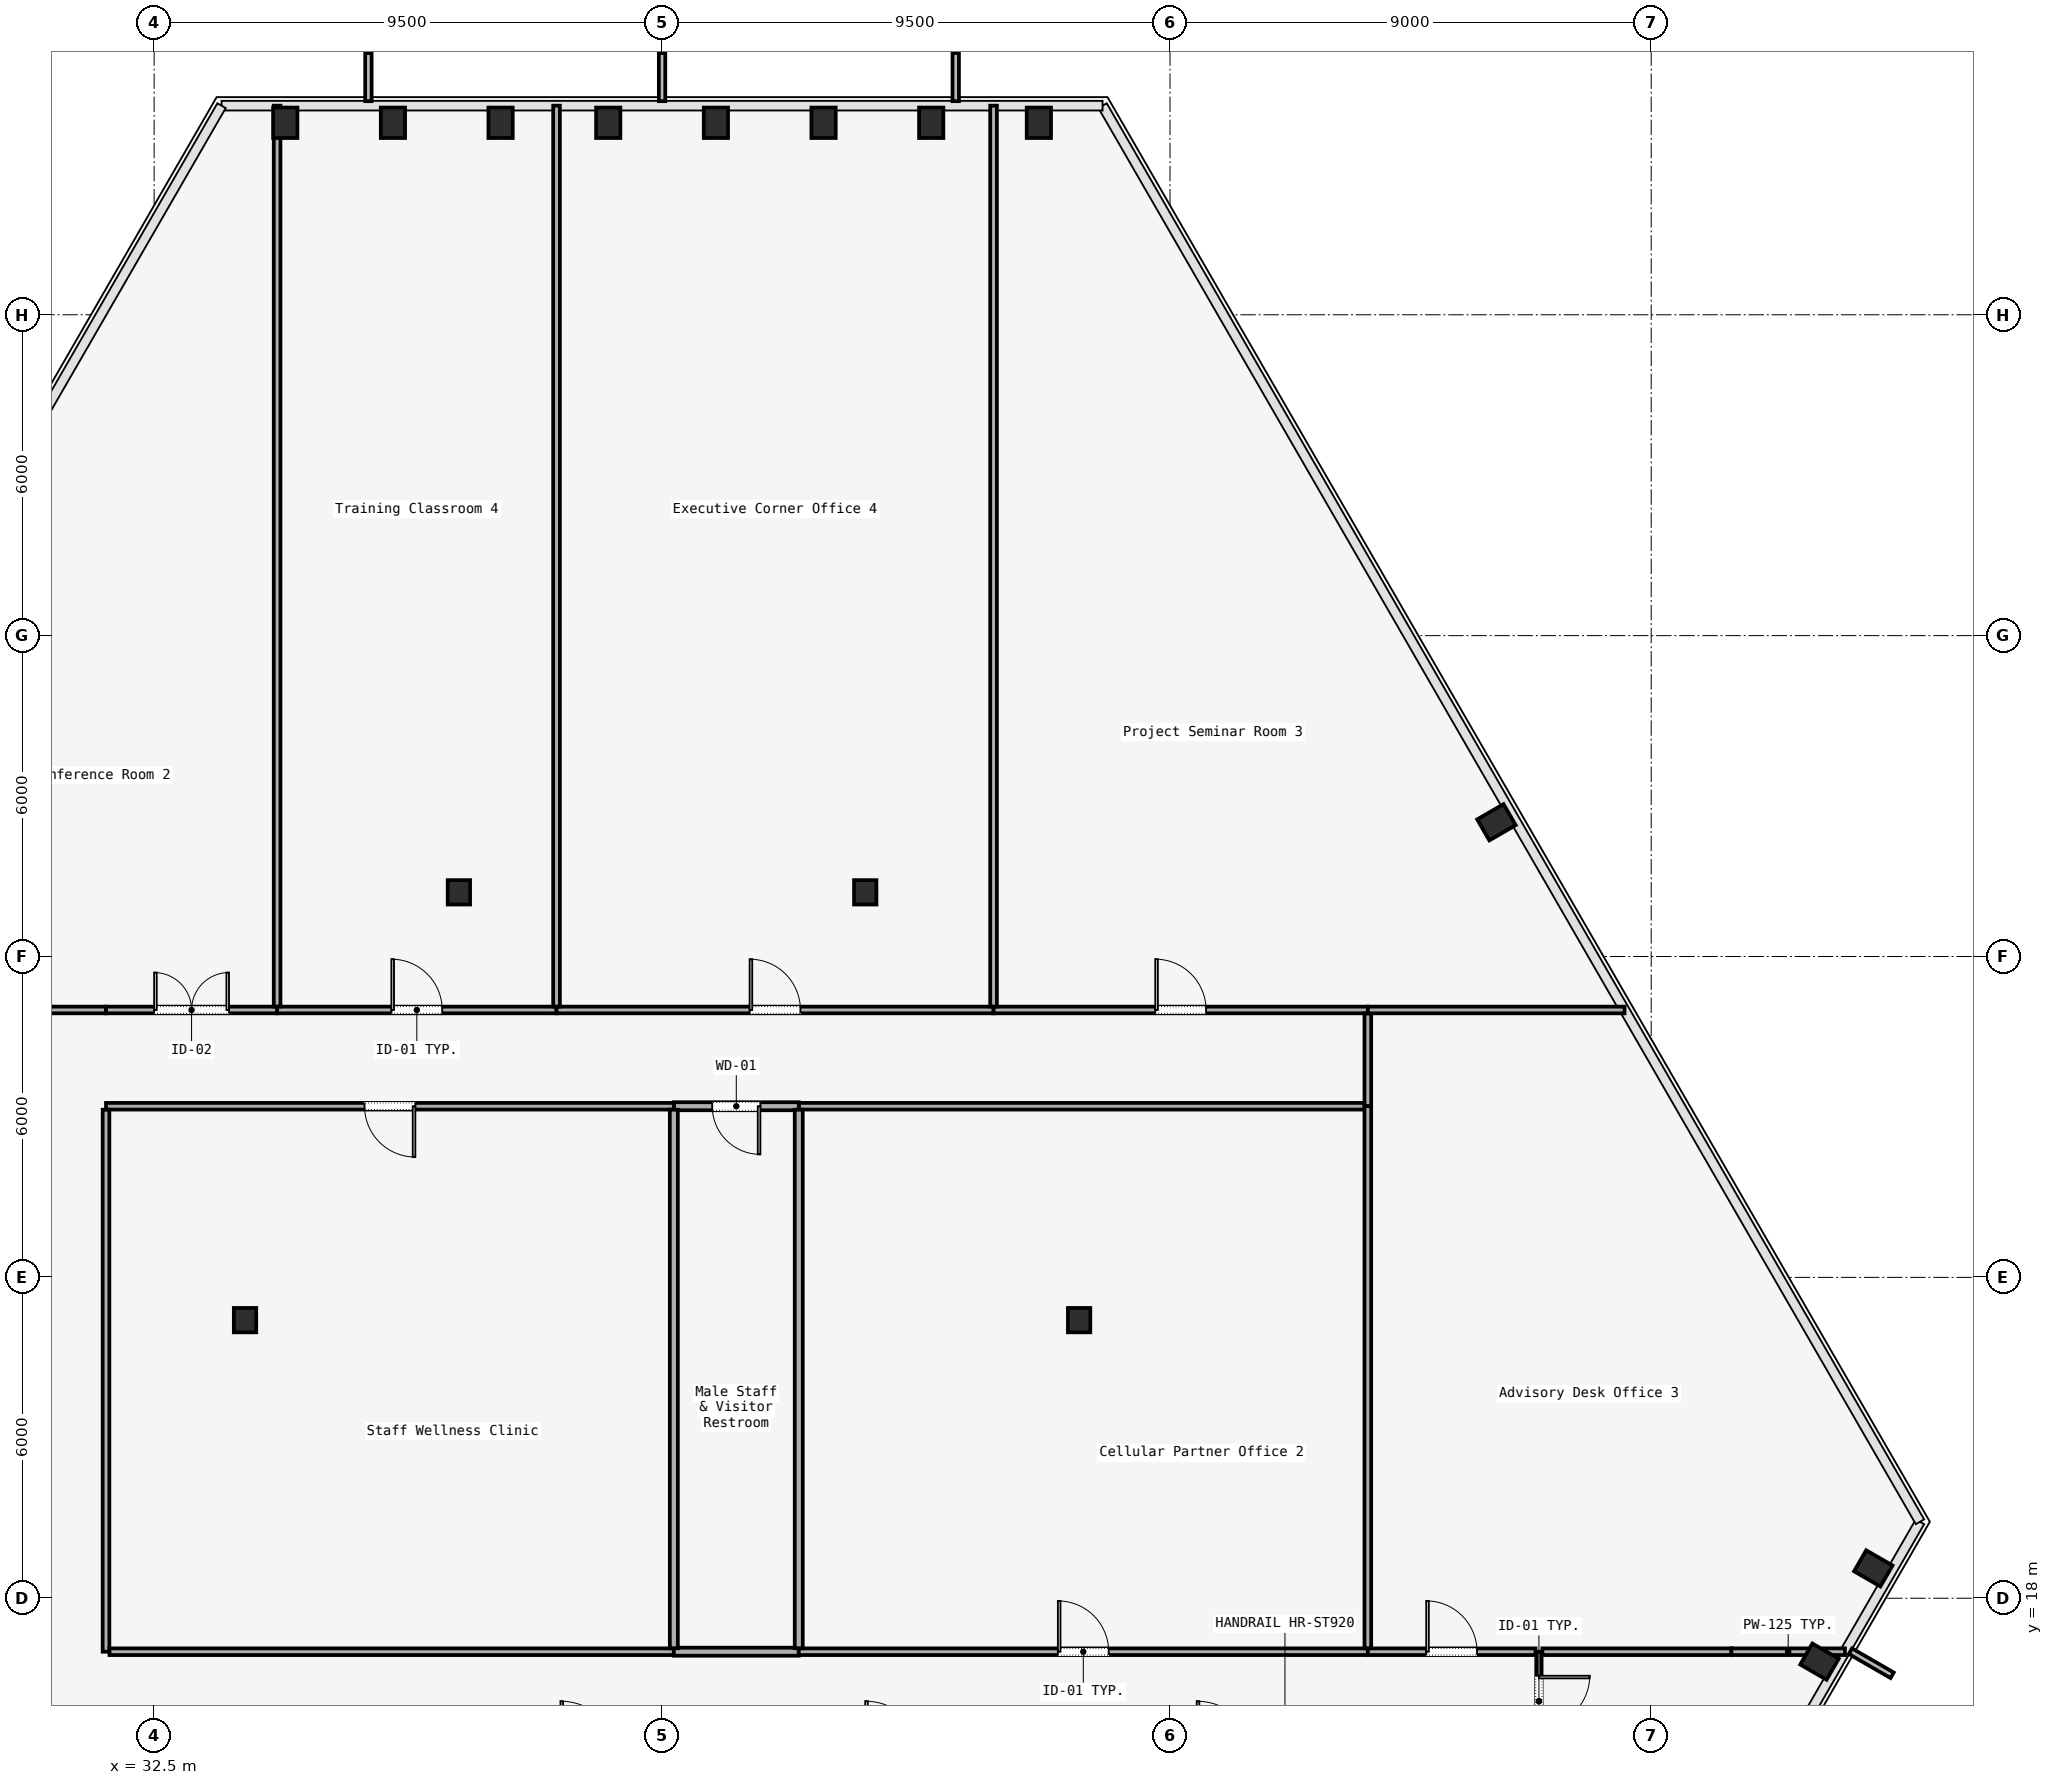
"""IFC4 building model, lengths in metres.
Left out: names, types, materials, properties, quantities, classifications, styles, units other than length and angle.
Written with IfcOpenShell. Run it as: python <this file> out.ifc"""

import sys

from ifc_helpers import new_model, si_unit, direction, frame, frame_2d, origin, origin_2d, place, context, subcontext, project, spatial, rectangle, i_section, extrude, element, fill, save


model = new_model("IFC4")
c1 = context("Model", 3, precision=1e-05, world=origin(), true_north=direction((0.0, 1.0)))
c2 = subcontext(c1, "Body", "Model", "MODEL_VIEW")
j1 = project(units=[si_unit("LENGTHUNIT", "METRE"), si_unit("PLANEANGLEUNIT", "RADIAN")], contexts=[c1])
p1 = place(None, origin())
s1 = spatial("IfcSite", under=j1, at=p1, CompositionType="ELEMENT")
p2 = place(p1, origin())
s2 = spatial("IfcBuilding", under=s1, at=p2, CompositionType="ELEMENT")
p3 = place(p2, frame((0.0, 0.0, 39.8)))
s3 = spatial("IfcBuildingStorey", under=s2, at=p3, CompositionType="ELEMENT", Elevation=39.8)
for number, where, z_axis, x_axis in (
    (1, (34.2, 23.2, 0.0), (0.0, 0.0, 1.0), (1.0, 0.0, 0.0)),
    (2, (49.8, 23.2, 0.0), (0.0, 0.0, 1.0), (1.0, 0.0, 0.0)),
    (3, (38.2, 31.2, 0.0), (0.0, 0.0, 1.0), (1.0, 0.0, 0.0)),
    (4, (45.8, 31.2, 0.0), (0.0, 0.0, 1.0), (1.0, 0.0, 0.0)),
):
    element("IfcColumn", number, at=place(p3, frame(where, z_axis=z_axis, x_axis=x_axis)), inside=s3, PredefinedType="COLUMN", context=c2, shape_type="SweptSolid", body=[
        extrude(i_section(OverallWidth=0.418, OverallDepth=0.456, WebThickness=0.042, FlangeThickness=0.067, FilletRadius=0.015, at=origin_2d()), origin(), (0.0, 0.0, 1.0), 3.58),
    ])
for number, where, z_axis, x_axis in (
    (5, (63.647, 16.814, 0.0), (0.0, 0.0, 1.0), (0.5, 0.866, 0.0)),
    (6, (64.654, 18.558, 0.0), (0.0, 0.0, 1.0), (0.5, 0.866, 0.0)),
    (7, (57.606, 32.51, 0.0), (0.0, 0.0, 1.0), (-0.5, 0.866, 0.0)),
    (8, (49.047, 45.59, 0.0), (0.0, 0.0, 1.0), (1.0, 0.0, 0.0)),
    (9, (47.034, 45.59, 0.0), (0.0, 0.0, 1.0), (1.0, 0.0, 0.0)),
    (10, (45.02, 45.59, 0.0), (0.0, 0.0, 1.0), (1.0, 0.0, 0.0)),
    (11, (43.007, 45.59, 0.0), (0.0, 0.0, 1.0), (1.0, 0.0, 0.0)),
    (12, (40.993, 45.59, 0.0), (0.0, 0.0, 1.0), (1.0, 0.0, 0.0)),
    (13, (38.98, 45.59, 0.0), (0.0, 0.0, 1.0), (1.0, 0.0, 0.0)),
    (14, (36.966, 45.59, 0.0), (0.0, 0.0, 1.0), (1.0, 0.0, 0.0)),
    (15, (34.953, 45.59, 0.0), (0.0, 0.0, 1.0), (1.0, 0.0, 0.0)),
):
    element("IfcColumn", number, at=place(p3, frame(where, z_axis=z_axis, x_axis=x_axis)), inside=s3, PredefinedType="COLUMN", context=c2, shape_type="SweptSolid", body=[
        extrude(i_section(OverallWidth=0.454, OverallDepth=0.569, WebThickness=0.078, FlangeThickness=0.08, FilletRadius=0.015, at=origin_2d()), origin(), (0.0, 0.0, 1.0), 3.58),
    ])
p4 = place(p3, frame((58.4, 17.0, 0.0), z_axis=(0.0, 0.0, 1.0), x_axis=(0.0, -1.0, 0.0)))
e16 = element("IfcWall", 16, at=p4, inside=s3, PredefinedType="MOVABLE", context=c2, shape_type="SweptSolid", body=[
    extrude(rectangle(XDim=1.85, YDim=0.1, at=frame_2d((0.925, 0.0))), origin(), (0.0, 0.0, 1.0), 2.933),
])
p5 = place(p4, frame((0.45, 0.0, 0.0)))
e17 = element("IfcOpeningElement", 17, at=p5, cuts=e16, PredefinedType="OPENING", context=c2, shape_type="SweptSolid", body=[
    extrude(rectangle(XDim=0.95, YDim=2.2, at=frame_2d((0.475, 1.1))), frame((0.0, 0.05, 0.0), z_axis=(0.0, -1.0, 0.0), x_axis=(1.0, 0.0, 0.0)), (0.0, 0.0, 1.0), 0.1),
])
p6 = place(p3, frame((29.865, 29.0, 0.0), z_axis=(0.0, 0.0, 1.0), x_axis=(1.0, 0.0, 0.0)))
e18 = element("IfcWall", 18, at=p6, inside=s3, PredefinedType="PARTITIONING", context=c2, shape_type="SweptSolid", body=[
    extrude(rectangle(XDim=1.735, YDim=0.125, at=frame_2d((0.868, 0.0))), origin(), (0.0, 0.0, 1.0), 2.933),
])
p7 = place(p3, frame((31.6, 29.0, 0.0), z_axis=(0.0, 0.0, 1.0), x_axis=(1.0, 0.0, 0.0)))
e19 = element("IfcWall", 19, at=p7, inside=s3, PredefinedType="PARTITIONING", context=c2, shape_type="SweptSolid", body=[
    extrude(rectangle(XDim=3.2, YDim=0.125, at=frame_2d((1.6, 0.0))), origin(), (0.0, 0.0, 1.0), 2.933),
])
p8 = place(p7, frame((0.9, 0.0, 0.0)))
e20 = element("IfcOpeningElement", 20, at=p8, cuts=e19, PredefinedType="OPENING", context=c2, shape_type="SweptSolid", body=[
    extrude(rectangle(XDim=1.4, YDim=2.2, at=frame_2d((0.7, 1.1))), frame((0.0, 0.062, 0.0), z_axis=(0.0, -1.0, 0.0), x_axis=(1.0, 0.0, 0.0)), (0.0, 0.0, 1.0), 0.125),
])
p9 = place(p3, frame((34.8, 29.0, 0.0), z_axis=(0.0, 0.0, 1.0), x_axis=(1.0, 0.0, 0.0)))
e21 = element("IfcWall", 21, at=p9, inside=s3, PredefinedType="PARTITIONING", context=c2, shape_type="SweptSolid", body=[
    extrude(rectangle(XDim=5.226, YDim=0.125, at=frame_2d((2.613, 0.0))), origin(), (0.0, 0.0, 1.0), 2.933),
])
p10 = place(p9, frame((2.138, 0.0, 0.0)))
e22 = element("IfcOpeningElement", 22, at=p10, cuts=e21, PredefinedType="OPENING", context=c2, shape_type="SweptSolid", body=[
    extrude(rectangle(XDim=0.95, YDim=2.2, at=frame_2d((0.475, 1.1))), frame((0.0, 0.062, 0.0), z_axis=(0.0, -1.0, 0.0), x_axis=(1.0, 0.0, 0.0)), (0.0, 0.0, 1.0), 0.125),
])
p11 = place(p3, frame((40.026, 29.0, 0.0), z_axis=(0.0, 0.0, 1.0), x_axis=(1.0, 0.0, 0.0)))
e23 = element("IfcWall", 23, at=p11, inside=s3, PredefinedType="PARTITIONING", context=c2, shape_type="SweptSolid", body=[
    extrude(rectangle(XDim=8.174, YDim=0.125, at=frame_2d((4.087, 0.0))), origin(), (0.0, 0.0, 1.0), 2.933),
])
p12 = place(p11, frame((3.612, 0.0, 0.0)))
e24 = element("IfcOpeningElement", 24, at=p12, cuts=e23, PredefinedType="OPENING", context=c2, shape_type="SweptSolid", body=[
    extrude(rectangle(XDim=0.95, YDim=2.2, at=frame_2d((0.475, 1.1))), frame((0.0, 0.062, 0.0), z_axis=(0.0, -1.0, 0.0), x_axis=(1.0, 0.0, 0.0)), (0.0, 0.0, 1.0), 0.125),
])
p13 = place(p3, frame((48.2, 29.0, 0.0), z_axis=(0.0, 0.0, 1.0), x_axis=(1.0, 0.0, 0.0)))
e25 = element("IfcWall", 25, at=p13, inside=s3, PredefinedType="PARTITIONING", context=c2, shape_type="SweptSolid", body=[
    extrude(rectangle(XDim=7.0, YDim=0.125, at=frame_2d((3.5, 0.0))), origin(), (0.0, 0.0, 1.0), 2.933),
])
p14 = place(p13, frame((3.025, 0.0, 0.0)))
e26 = element("IfcOpeningElement", 26, at=p14, cuts=e25, PredefinedType="OPENING", context=c2, shape_type="SweptSolid", body=[
    extrude(rectangle(XDim=0.95, YDim=2.2, at=frame_2d((0.475, 1.1))), frame((0.0, 0.062, 0.0), z_axis=(0.0, -1.0, 0.0), x_axis=(1.0, 0.0, 0.0)), (0.0, 0.0, 1.0), 0.125),
])
p15 = place(p3, frame((55.2, 28.935, 0.0), z_axis=(0.0, 0.0, 1.0), x_axis=(0.0, -1.0, 0.0)))
e27 = element("IfcWall", 27, at=p15, inside=s3, PredefinedType="PARTITIONING", context=c2, shape_type="SweptSolid", body=[
    extrude(rectangle(XDim=1.735, YDim=0.125, at=frame_2d((0.868, 0.0))), origin(), (0.0, 0.0, 1.0), 2.933),
])
p16 = place(p3, frame((55.135, 27.2, 0.0), z_axis=(0.0, 0.0, 1.0), x_axis=(-1.0, 0.0, 0.0)))
e28 = element("IfcWall", 28, at=p16, inside=s3, PredefinedType="PARTITIONING", context=c2, shape_type="SweptSolid", body=[
    extrude(rectangle(XDim=10.579, YDim=0.125, at=frame_2d((5.289, 0.0))), origin(), (0.0, 0.0, 1.0), 2.933),
])
p17 = place(p3, frame((44.556, 27.2, 0.0), z_axis=(0.0, 0.0, 1.0), x_axis=(-1.0, 0.0, 0.0)))
e29 = element("IfcWall", 29, at=p17, inside=s3, PredefinedType="PARTITIONING", context=c2, shape_type="SweptSolid", body=[
    extrude(rectangle(XDim=2.336, YDim=0.15, at=frame_2d((1.168, 0.0))), origin(), (0.0, 0.0, 1.0), 2.933),
])
p18 = place(p17, frame((0.718, 0.0, 0.0)))
e30 = element("IfcOpeningElement", 30, at=p18, cuts=e29, PredefinedType="OPENING", context=c2, shape_type="SweptSolid", body=[
    extrude(rectangle(XDim=0.9, YDim=2.15, at=frame_2d((0.45, 1.075))), frame((0.0, 0.075, 0.0), z_axis=(0.0, -1.0, 0.0), x_axis=(1.0, 0.0, 0.0)), (0.0, 0.0, 1.0), 0.15),
])
p19 = place(p3, frame((42.22, 27.2, 0.0), z_axis=(0.0, 0.0, 1.0), x_axis=(-1.0, 0.0, 0.0)))
e31 = element("IfcWall", 31, at=p19, inside=s3, PredefinedType="PARTITIONING", context=c2, shape_type="SweptSolid", body=[
    extrude(rectangle(XDim=10.62, YDim=0.125, at=frame_2d((5.31, 0.0))), origin(), (0.0, 0.0, 1.0), 2.933),
])
p20 = place(p19, frame((4.835, 0.0, 0.0)))
e32 = element("IfcOpeningElement", 32, at=p20, cuts=e31, PredefinedType="OPENING", context=c2, shape_type="SweptSolid", body=[
    extrude(rectangle(XDim=0.95, YDim=2.2, at=frame_2d((0.475, 1.1))), frame((0.0, 0.062, 0.0), z_axis=(0.0, -1.0, 0.0), x_axis=(1.0, 0.0, 0.0)), (0.0, 0.0, 1.0), 0.125),
])
p21 = place(p3, frame((31.6, 27.135, 0.0), z_axis=(0.0, 0.0, 1.0), x_axis=(0.0, -1.0, 0.0)))
e33 = element("IfcWall", 33, at=p21, inside=s3, PredefinedType="PARTITIONING", context=c2, shape_type="SweptSolid", body=[
    extrude(rectangle(XDim=10.135, YDim=0.125, at=frame_2d((5.067, 0.0))), origin(), (0.0, 0.0, 1.0), 2.933),
])
p22 = place(p3, frame((31.665, 17.0, 0.0), z_axis=(0.0, 0.0, 1.0), x_axis=(1.0, 0.0, 0.0)))
e34 = element("IfcWall", 34, at=p22, inside=s3, PredefinedType="PARTITIONING", context=c2, shape_type="SweptSolid", body=[
    extrude(rectangle(XDim=10.555, YDim=0.125, at=frame_2d((5.277, 0.0))), origin(), (0.0, 0.0, 1.0), 2.933),
])
p23 = place(p3, frame((42.22, 17.0, 0.0), z_axis=(0.0, 0.0, 1.0), x_axis=(1.0, 0.0, 0.0)))
e35 = element("IfcWall", 35, at=p23, inside=s3, PredefinedType="PARTITIONING", context=c2, shape_type="SweptSolid", body=[
    extrude(rectangle(XDim=2.336, YDim=0.15, at=frame_2d((1.168, 0.0))), origin(), (0.0, 0.0, 1.0), 2.933),
])
p24 = place(p3, frame((44.556, 17.0, 0.0), z_axis=(0.0, 0.0, 1.0), x_axis=(1.0, 0.0, 0.0)))
e36 = element("IfcWall", 36, at=p24, inside=s3, PredefinedType="PARTITIONING", context=c2, shape_type="SweptSolid", body=[
    extrude(rectangle(XDim=10.644, YDim=0.125, at=frame_2d((5.322, 0.0))), origin(), (0.0, 0.0, 1.0), 2.933),
])
p25 = place(p24, frame((4.847, 0.0, 0.0)))
e37 = element("IfcOpeningElement", 37, at=p25, cuts=e36, PredefinedType="OPENING", context=c2, shape_type="SweptSolid", body=[
    extrude(rectangle(XDim=0.95, YDim=2.2, at=frame_2d((0.475, 1.1))), frame((0.0, 0.062, 0.0), z_axis=(0.0, -1.0, 0.0), x_axis=(1.0, 0.0, 0.0)), (0.0, 0.0, 1.0), 0.125),
])
p26 = place(p3, frame((55.2, 17.0, 0.0), z_axis=(0.0, 0.0, 1.0), x_axis=(1.0, 0.0, 0.0)))
e38 = element("IfcWall", 38, at=p26, inside=s3, PredefinedType="PARTITIONING", context=c2, shape_type="SweptSolid", body=[
    extrude(rectangle(XDim=3.135, YDim=0.125, at=frame_2d((1.567, 0.0))), origin(), (0.0, 0.0, 1.0), 2.933),
])
p27 = place(p26, frame((1.093, 0.0, 0.0)))
e39 = element("IfcOpeningElement", 39, at=p27, cuts=e38, PredefinedType="OPENING", context=c2, shape_type="SweptSolid", body=[
    extrude(rectangle(XDim=0.95, YDim=2.2, at=frame_2d((0.475, 1.1))), frame((0.0, 0.062, 0.0), z_axis=(0.0, -1.0, 0.0), x_axis=(1.0, 0.0, 0.0)), (0.0, 0.0, 1.0), 0.125),
])
p28 = place(p3, frame((58.465, 17.0, 0.0), z_axis=(0.0, 0.0, 1.0), x_axis=(1.0, 0.0, 0.0)))
e40 = element("IfcWall", 40, at=p28, inside=s3, PredefinedType="PARTITIONING", context=c2, shape_type="SweptSolid", body=[
    extrude(rectangle(XDim=3.535, YDim=0.125, at=frame_2d((1.768, 0.0))), origin(), (0.0, 0.0, 1.0), 2.933),
])
p29 = place(p3, frame((62.0, 17.0, 0.0), z_axis=(0.0, 0.0, 1.0), x_axis=(1.0, 0.0, 0.0)))
e41 = element("IfcWall", 41, at=p29, inside=s3, PredefinedType="PARTITIONING", context=c2, shape_type="SweptSolid", body=[
    extrude(rectangle(XDim=2.124, YDim=0.125, at=frame_2d((1.062, 0.0))), origin(), (0.0, 0.0, 1.0), 2.933),
])
for number, where, z_axis, x_axis in (
    (42, (42.22, 27.135, 0.0), (0.0, 0.0, 1.0), (0.0, -1.0, 0.0)),
    (43, (44.556, 27.135, 0.0), (0.0, 0.0, 1.0), (0.0, -1.0, 0.0)),
):
    element("IfcWall", number, at=place(p3, frame(where, z_axis=z_axis, x_axis=x_axis)), inside=s3, PredefinedType="PARTITIONING", context=c2, shape_type="SweptSolid", body=[
        extrude(rectangle(XDim=10.07, YDim=0.15, at=frame_2d((5.035, 0.0))), origin(), (0.0, 0.0, 1.0), 2.933),
    ])
p30 = place(p3, frame((55.2, 27.2, 0.0), z_axis=(0.0, 0.0, 1.0), x_axis=(0.0, -1.0, 0.0)))
e44 = element("IfcWall", 44, at=p30, inside=s3, PredefinedType="PARTITIONING", context=c2, shape_type="SweptSolid", body=[
    extrude(rectangle(XDim=10.135, YDim=0.125, at=frame_2d((5.067, 0.0))), origin(), (0.0, 0.0, 1.0), 2.933),
])
p31 = place(p3, frame((55.2, 29.0, 0.0), z_axis=(0.0, 0.0, 1.0), x_axis=(1.0, 0.0, 0.0)))
e45 = element("IfcWall", 45, at=p31, inside=s3, PredefinedType="PARTITIONING", context=c2, shape_type="SweptSolid", body=[
    extrude(rectangle(XDim=4.802, YDim=0.125, at=frame_2d((2.401, 0.0))), origin(), (0.0, 0.0, 1.0), 2.933),
])
for number, where, z_axis, x_axis in (
    (46, (34.8, 45.91, 0.0), (0.0, 0.0, 1.0), (0.0, -1.0, 0.0)),
    (47, (48.2, 29.065, 0.0), (0.0, 0.0, 1.0), (0.0, 1.0, 0.0)),
    (48, (40.026, 29.065, 0.0), (0.0, 0.0, 1.0), (0.0, 1.0, 0.0)),
):
    element("IfcWall", number, at=place(p3, frame(where, z_axis=z_axis, x_axis=x_axis)), inside=s3, PredefinedType="PARTITIONING", context=c2, shape_type="SweptSolid", body=[
        extrude(rectangle(XDim=16.845, YDim=0.125, at=frame_2d((8.422, 0.0))), origin(), (0.0, 0.0, 1.0), 2.933),
    ])
p32 = place(p5, origin())
e49 = element("IfcDoor", 49, at=p32, inside=s3, OperationType="SINGLE_SWING_LEFT", PredefinedType="DOOR", context=c2, shape_type="SweptSolid", body=[
    extrude(rectangle(XDim=0.95, YDim=2.2, at=frame_2d((0.475, 1.1))), frame((0.0, 0.025, 0.0), z_axis=(0.0, -1.0, 0.0), x_axis=(1.0, 0.0, 0.0)), (0.0, 0.0, 1.0), 0.05),
])
fill(e17, e49)
p33 = place(p20, origin())
e50 = element("IfcDoor", 50, at=p33, inside=s3, OperationType="SINGLE_SWING_LEFT", PredefinedType="DOOR", context=c2, shape_type="SweptSolid", body=[
    extrude(rectangle(XDim=0.95, YDim=2.2, at=frame_2d((0.475, 1.1))), frame((0.0, 0.025, 0.0), z_axis=(0.0, -1.0, 0.0), x_axis=(1.0, 0.0, 0.0)), (0.0, 0.0, 1.0), 0.05),
])
fill(e32, e50)
p34 = place(p18, origin())
e51 = element("IfcDoor", 51, at=p34, inside=s3, OperationType="SINGLE_SWING_RIGHT", PredefinedType="DOOR", context=c2, shape_type="SweptSolid", body=[
    extrude(rectangle(XDim=0.9, YDim=2.15, at=frame_2d((0.45, 1.075))), frame((0.0, 0.025, 0.0), z_axis=(0.0, -1.0, 0.0), x_axis=(1.0, 0.0, 0.0)), (0.0, 0.0, 1.0), 0.05),
])
fill(e30, e51)
p35 = place(p25, origin())
e52 = element("IfcDoor", 52, at=p35, inside=s3, OperationType="SINGLE_SWING_LEFT", PredefinedType="DOOR", context=c2, shape_type="SweptSolid", body=[
    extrude(rectangle(XDim=0.95, YDim=2.2, at=frame_2d((0.475, 1.1))), frame((0.0, 0.025, 0.0), z_axis=(0.0, -1.0, 0.0), x_axis=(1.0, 0.0, 0.0)), (0.0, 0.0, 1.0), 0.05),
])
fill(e37, e52)
p36 = place(p27, origin())
e53 = element("IfcDoor", 53, at=p36, inside=s3, OperationType="SINGLE_SWING_RIGHT", PredefinedType="DOOR", context=c2, shape_type="SweptSolid", body=[
    extrude(rectangle(XDim=0.95, YDim=2.2, at=frame_2d((0.475, 1.1))), frame((0.0, 0.025, 0.0), z_axis=(0.0, -1.0, 0.0), x_axis=(1.0, 0.0, 0.0)), (0.0, 0.0, 1.0), 0.05),
])
fill(e39, e53)
p37 = place(p8, origin())
e54 = element("IfcDoor", 54, at=p37, inside=s3, OperationType="SINGLE_SWING_RIGHT", PredefinedType="DOOR", context=c2, shape_type="SweptSolid", body=[
    extrude(rectangle(XDim=1.4, YDim=2.2, at=frame_2d((0.7, 1.1))), frame((0.0, 0.025, 0.0), z_axis=(0.0, -1.0, 0.0), x_axis=(1.0, 0.0, 0.0)), (0.0, 0.0, 1.0), 0.05),
])
fill(e20, e54)
p38 = place(p14, origin())
e55 = element("IfcDoor", 55, at=p38, inside=s3, OperationType="SINGLE_SWING_LEFT", PredefinedType="DOOR", context=c2, shape_type="SweptSolid", body=[
    extrude(rectangle(XDim=0.95, YDim=2.2, at=frame_2d((0.475, 1.1))), frame((0.0, 0.025, 0.0), z_axis=(0.0, -1.0, 0.0), x_axis=(1.0, 0.0, 0.0)), (0.0, 0.0, 1.0), 0.05),
])
fill(e26, e55)
p39 = place(p12, origin())
e56 = element("IfcDoor", 56, at=p39, inside=s3, OperationType="SINGLE_SWING_RIGHT", PredefinedType="DOOR", context=c2, shape_type="SweptSolid", body=[
    extrude(rectangle(XDim=0.95, YDim=2.2, at=frame_2d((0.475, 1.1))), frame((0.0, 0.025, 0.0), z_axis=(0.0, -1.0, 0.0), x_axis=(1.0, 0.0, 0.0)), (0.0, 0.0, 1.0), 0.05),
])
fill(e24, e56)
p40 = place(p10, origin())
e57 = element("IfcDoor", 57, at=p40, inside=s3, OperationType="SINGLE_SWING_LEFT", PredefinedType="DOOR", context=c2, shape_type="SweptSolid", body=[
    extrude(rectangle(XDim=0.95, YDim=2.2, at=frame_2d((0.475, 1.1))), frame((0.0, 0.025, 0.0), z_axis=(0.0, -1.0, 0.0), x_axis=(1.0, 0.0, 0.0)), (0.0, 0.0, 1.0), 0.05),
])
fill(e22, e57)
save(model, sys.argv[1])
